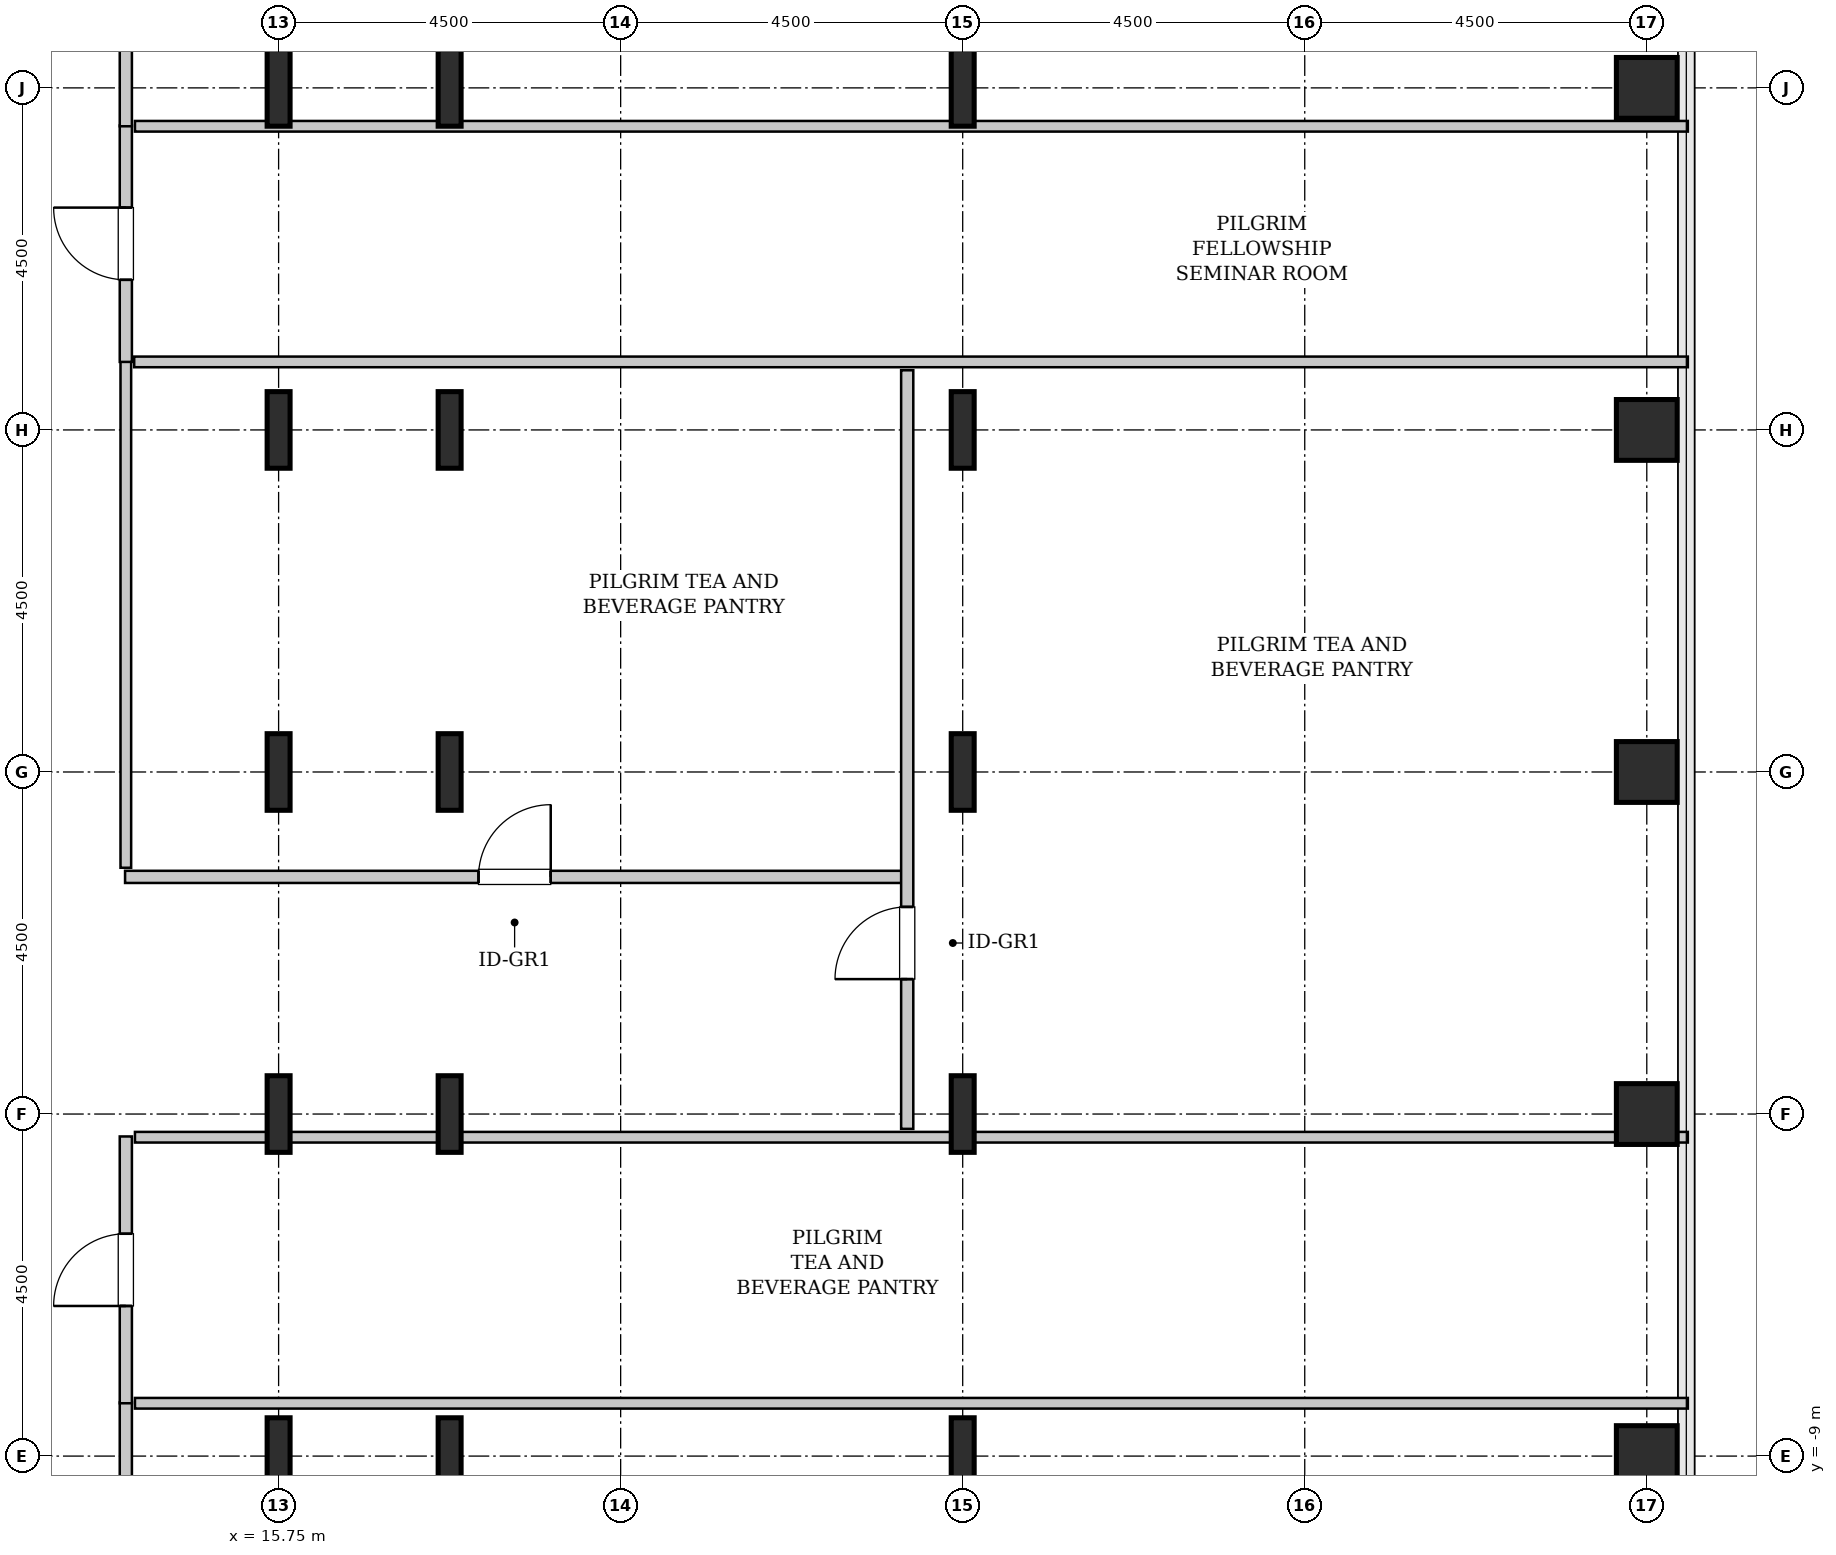
"""IFC4 building model, lengths in metres.
Left out: names, types, materials, properties, quantities, classifications, styles, units other than length and angle.
Written with IfcOpenShell. Run it as: python <this file> out.ifc"""

import sys

from ifc_helpers import new_model, si_unit, direction, frame, frame_2d, origin, origin_2d, place, context, subcontext, project, spatial, rectangle, hollow_rectangle, i_section, extrude, source, transform, mapped, element, fill, save


model = new_model("IFC4")
c1 = context("Model", 3, precision=1e-05, world=origin(), true_north=direction((0.0, 1.0)))
c2 = subcontext(c1, "Body", "Model", "MODEL_VIEW")
j1 = project(units=[si_unit("LENGTHUNIT", "METRE"), si_unit("PLANEANGLEUNIT", "RADIAN")], contexts=[c1])
p1 = place(None, origin())
s1 = spatial("IfcSite", under=j1, at=p1, CompositionType="ELEMENT")
p2 = place(p1, origin())
s2 = spatial("IfcBuilding", under=s1, at=p2, CompositionType="ELEMENT")
p3 = place(p2, frame((0.0, 0.0, 128.8)))
s3 = spatial("IfcBuildingStorey", under=s2, at=p3, CompositionType="ELEMENT", Elevation=128.8)
m1 = source(origin(), c2, "Body", "SweptSolid", [
    extrude(i_section(OverallWidth=0.302, OverallDepth=1.008, WebThickness=0.021, FlangeThickness=0.04, FilletRadius=0.03, at=origin_2d()), origin(), (0.0, 0.0, 1.0), 3.8),
])
for number, where, z_axis, x_axis in (
    (1, (15.75, -9.0, 0.0), (0.0, 0.0, 1.0), (1.0, 0.0, 0.0)),
    (2, (15.75, -4.5, 0.0), (0.0, 0.0, 1.0), (1.0, 0.0, 0.0)),
    (3, (15.75, 0.0, 0.0), (0.0, 0.0, 1.0), (1.0, 0.0, 0.0)),
    (4, (15.75, 4.5, 0.0), (0.0, 0.0, 1.0), (1.0, 0.0, 0.0)),
    (5, (15.75, 9.0, 0.0), (0.0, 0.0, 1.0), (1.0, 0.0, 0.0)),
    (6, (18.0, -9.0, 0.0), (0.0, 0.0, 1.0), (1.0, 0.0, 0.0)),
    (7, (18.0, -4.5, 0.0), (0.0, 0.0, 1.0), (1.0, 0.0, 0.0)),
    (8, (18.0, 0.0, 0.0), (0.0, 0.0, 1.0), (1.0, 0.0, 0.0)),
    (9, (18.0, 4.5, 0.0), (0.0, 0.0, 1.0), (1.0, 0.0, 0.0)),
    (10, (18.0, 9.0, 0.0), (0.0, 0.0, 1.0), (1.0, 0.0, 0.0)),
    (11, (24.75, -9.0, 0.0), (0.0, 0.0, 1.0), (1.0, 0.0, 0.0)),
    (12, (24.75, -4.5, 0.0), (0.0, 0.0, 1.0), (1.0, 0.0, 0.0)),
    (13, (24.75, 0.0, 0.0), (0.0, 0.0, 1.0), (1.0, 0.0, 0.0)),
    (14, (24.75, 4.5, 0.0), (0.0, 0.0, 1.0), (1.0, 0.0, 0.0)),
    (15, (24.75, 9.0, 0.0), (0.0, 0.0, 1.0), (1.0, 0.0, 0.0)),
):
    element("IfcColumn", number, at=place(p3, frame(where, z_axis=z_axis, x_axis=x_axis)), inside=s3, PredefinedType="COLUMN", context=c2, shape_type="MappedRepresentation", body=[
        mapped(m1, transform((0.0, 0.0, 0.0), x_axis=(1.0, 0.0, 0.0), y_axis=(0.0, 1.0, 0.0), z_axis=(0.0, 0.0, 1.0), scale=1.0)),
    ])
m2 = source(origin(), c2, "Body", "SweptSolid", [
    extrude(hollow_rectangle(XDim=0.8, YDim=0.8, WallThickness=0.04, InnerFilletRadius=0.04, OuterFilletRadius=0.08, at=origin_2d()), origin(), (0.0, 0.0, 1.0), 3.8),
])
for number, where, z_axis, x_axis in (
    (16, (33.75, -9.0, 0.0), (0.0, 0.0, 1.0), (1.0, 0.0, 0.0)),
    (17, (33.75, -4.5, 0.0), (0.0, 0.0, 1.0), (1.0, 0.0, 0.0)),
    (18, (33.75, 0.0, 0.0), (0.0, 0.0, 1.0), (1.0, 0.0, 0.0)),
    (19, (33.75, 4.5, 0.0), (0.0, 0.0, 1.0), (1.0, 0.0, 0.0)),
    (20, (33.75, 9.0, 0.0), (0.0, 0.0, 1.0), (1.0, 0.0, 0.0)),
):
    element("IfcColumn", number, at=place(p3, frame(where, z_axis=z_axis, x_axis=x_axis)), inside=s3, PredefinedType="COLUMN", context=c2, shape_type="MappedRepresentation", body=[
        mapped(m2, transform((0.0, 0.0, 0.0), x_axis=(1.0, 0.0, 0.0), y_axis=(0.0, 1.0, 0.0), z_axis=(0.0, 0.0, 1.0), scale=1.0)),
    ])
m3 = source(origin(), c2, "Body", "SweptSolid", [
    extrude(rectangle(XDim=14.745, YDim=0.16, at=frame_2d((7.373, 0.0))), origin(), (0.0, 0.0, 1.0), 3.535),
])
p4 = place(p3, frame((13.74, -23.04, 0.0), z_axis=(0.0, 0.0, 1.0), x_axis=(0.0, 1.0, 0.0)))
e21 = element("IfcWall", 21, at=p4, inside=s3, PredefinedType="PARTITIONING", context=c2, shape_type="MappedRepresentation", body=[
    mapped(m3, transform((0.0, 0.0, 0.0), x_axis=(1.0, 0.0, 0.0), y_axis=(0.0, 1.0, 0.0), z_axis=(0.0, 0.0, 1.0), scale=1.0)),
])
p5 = place(p4, frame((12.663, 0.0, 0.0)))
e22 = element("IfcOpeningElement", 22, at=p5, cuts=e21, PredefinedType="OPENING", context=c2, shape_type="SweptSolid", body=[
    extrude(rectangle(XDim=0.95, YDim=2.1, at=frame_2d((0.475, 1.05))), frame((0.0, 0.09, 0.0), z_axis=(0.0, -1.0, 0.0), x_axis=(1.0, 0.0, 0.0)), (0.0, 0.0, 1.0), 0.18),
])
m4 = source(origin(), c2, "Body", "SweptSolid", [
    extrude(rectangle(XDim=20.43, YDim=0.14, at=frame_2d((10.215, 0.0))), origin(), (0.0, 0.0, 1.0), 3.535),
])
p6 = place(p3, frame((13.86, -8.305, 0.0), z_axis=(0.0, 0.0, 1.0), x_axis=(1.0, 0.0, 0.0)))
e23 = element("IfcWall", 23, at=p6, inside=s3, PredefinedType="PARTITIONING", context=c2, shape_type="MappedRepresentation", body=[
    mapped(m4, transform((0.0, 0.0, 0.0), x_axis=(1.0, 0.0, 0.0), y_axis=(0.0, 1.0, 0.0), z_axis=(0.0, 0.0, 1.0), scale=1.0)),
])
m5 = source(origin(), c2, "Body", "SweptSolid", [
    extrude(rectangle(XDim=3.51, YDim=0.16, at=frame_2d((1.755, 0.0))), origin(), (0.0, 0.0, 1.0), 3.535),
])
p7 = place(p3, frame((13.74, -8.305, 0.0), z_axis=(0.0, 0.0, 1.0), x_axis=(0.0, 1.0, 0.0)))
e24 = element("IfcWall", 24, at=p7, inside=s3, PredefinedType="PARTITIONING", context=c2, shape_type="MappedRepresentation", body=[
    mapped(m5, transform((0.0, 0.0, 0.0), x_axis=(1.0, 0.0, 0.0), y_axis=(0.0, 1.0, 0.0), z_axis=(0.0, 0.0, 1.0), scale=1.0)),
])
p8 = place(p7, frame((1.28, 0.0, 0.0)))
e25 = element("IfcOpeningElement", 25, at=p8, cuts=e24, PredefinedType="OPENING", context=c2, shape_type="SweptSolid", body=[
    extrude(rectangle(XDim=0.95, YDim=2.1, at=frame_2d((0.475, 1.05))), frame((0.0, 0.09, 0.0), z_axis=(0.0, -1.0, 0.0), x_axis=(1.0, 0.0, 0.0)), (0.0, 0.0, 1.0), 0.18),
])
m6 = source(origin(), c2, "Body", "SweptSolid", [
    extrude(rectangle(XDim=20.43, YDim=0.14, at=frame_2d((10.215, 0.0))), origin(), (0.0, 0.0, 1.0), 2.875),
])
p9 = place(p3, frame((13.86, -4.805, 0.0), z_axis=(0.0, 0.0, 1.0), x_axis=(1.0, 0.0, 0.0)))
e26 = element("IfcWall", 26, at=p9, inside=s3, PredefinedType="PARTITIONING", context=c2, shape_type="MappedRepresentation", body=[
    mapped(m6, transform((0.0, 0.0, 0.0), x_axis=(1.0, 0.0, 0.0), y_axis=(0.0, 1.0, 0.0), z_axis=(0.0, 0.0, 1.0), scale=1.0)),
])
m7 = source(origin(), c2, "Body", "SweptSolid", [
    extrude(rectangle(XDim=10.25, YDim=0.16, at=frame_2d((5.125, 0.0))), origin(), (0.0, 0.0, 1.0), 3.535),
])
p10 = place(p3, frame((13.73, -1.38, 0.0), z_axis=(0.0, 0.0, 1.0), x_axis=(1.0, 0.0, 0.0)))
e27 = element("IfcWall", 27, at=p10, inside=s3, PredefinedType="PARTITIONING", context=c2, shape_type="MappedRepresentation", body=[
    mapped(m7, transform((0.0, 0.0, 0.0), x_axis=(1.0, 0.0, 0.0), y_axis=(0.0, 1.0, 0.0), z_axis=(0.0, 0.0, 1.0), scale=1.0)),
])
p11 = place(p10, frame((4.65, 0.0, 0.0)))
e28 = element("IfcOpeningElement", 28, at=p11, cuts=e27, PredefinedType="OPENING", context=c2, shape_type="SweptSolid", body=[
    extrude(rectangle(XDim=0.95, YDim=2.1, at=frame_2d((0.475, 1.05))), frame((0.0, 0.09, 0.0), z_axis=(0.0, -1.0, 0.0), x_axis=(1.0, 0.0, 0.0)), (0.0, 0.0, 1.0), 0.18),
])
m8 = source(origin(), c2, "Body", "SweptSolid", [
    extrude(rectangle(XDim=6.665, YDim=0.14, at=frame_2d((3.333, 0.0))), origin(), (0.0, 0.0, 1.0), 3.535),
])
p12 = place(p3, frame((13.74, -1.26, 0.0), z_axis=(0.0, 0.0, 1.0), x_axis=(0.0, 1.0, 0.0)))
e29 = element("IfcWall", 29, at=p12, inside=s3, PredefinedType="PARTITIONING", context=c2, shape_type="MappedRepresentation", body=[
    mapped(m8, transform((0.0, 0.0, 0.0), x_axis=(1.0, 0.0, 0.0), y_axis=(0.0, 1.0, 0.0), z_axis=(0.0, 0.0, 1.0), scale=1.0)),
])
m9 = source(origin(), c2, "Body", "SweptSolid", [
    extrude(rectangle(XDim=20.44, YDim=0.14, at=frame_2d((10.22, 0.0))), origin(), (0.0, 0.0, 1.0), 3.535),
])
p13 = place(p3, frame((13.85, 5.395, 0.0), z_axis=(0.0, 0.0, 1.0), x_axis=(1.0, 0.0, 0.0)))
e30 = element("IfcWall", 30, at=p13, inside=s3, PredefinedType="PARTITIONING", context=c2, shape_type="MappedRepresentation", body=[
    mapped(m9, transform((0.0, 0.0, 0.0), x_axis=(1.0, 0.0, 0.0), y_axis=(0.0, 1.0, 0.0), z_axis=(0.0, 0.0, 1.0), scale=1.0)),
])
m10 = source(origin(), c2, "Body", "SweptSolid", [
    extrude(rectangle(XDim=9.98, YDim=0.16, at=frame_2d((4.99, 0.0))), origin(), (0.0, 0.0, 1.0), 3.535),
])
p14 = place(p3, frame((24.02, -4.695, 0.0), z_axis=(0.0, 0.0, 1.0), x_axis=(0.0, 1.0, 0.0)))
e31 = element("IfcWall", 31, at=p14, inside=s3, PredefinedType="PARTITIONING", context=c2, shape_type="MappedRepresentation", body=[
    mapped(m10, transform((0.0, 0.0, 0.0), x_axis=(1.0, 0.0, 0.0), y_axis=(0.0, 1.0, 0.0), z_axis=(0.0, 0.0, 1.0), scale=1.0)),
])
p15 = place(p14, frame((1.97, 0.0, 0.0)))
e32 = element("IfcOpeningElement", 32, at=p15, cuts=e31, PredefinedType="OPENING", context=c2, shape_type="SweptSolid", body=[
    extrude(rectangle(XDim=0.95, YDim=2.1, at=frame_2d((0.475, 1.05))), frame((0.0, 0.09, 0.0), z_axis=(0.0, -1.0, 0.0), x_axis=(1.0, 0.0, 0.0)), (0.0, 0.0, 1.0), 0.18),
])
m11 = source(origin(), c2, "Body", "SweptSolid", [
    extrude(rectangle(XDim=3.11, YDim=0.16, at=frame_2d((1.555, 0.0))), origin(), (0.0, 0.0, 1.0), 3.535),
])
p16 = place(p3, frame((13.74, 5.395, 0.0), z_axis=(0.0, 0.0, 1.0), x_axis=(0.0, 1.0, 0.0)))
e33 = element("IfcWall", 33, at=p16, inside=s3, PredefinedType="PARTITIONING", context=c2, shape_type="MappedRepresentation", body=[
    mapped(m11, transform((0.0, 0.0, 0.0), x_axis=(1.0, 0.0, 0.0), y_axis=(0.0, 1.0, 0.0), z_axis=(0.0, 0.0, 1.0), scale=1.0)),
])
p17 = place(p16, frame((1.08, 0.0, 0.0)))
e34 = element("IfcOpeningElement", 34, at=p17, cuts=e33, PredefinedType="OPENING", context=c2, shape_type="SweptSolid", body=[
    extrude(rectangle(XDim=0.95, YDim=2.1, at=frame_2d((0.475, 1.05))), frame((0.0, 0.09, 0.0), z_axis=(0.0, -1.0, 0.0), x_axis=(1.0, 0.0, 0.0)), (0.0, 0.0, 1.0), 0.18),
])
p18 = place(p3, frame((13.86, 8.495, 0.0), z_axis=(0.0, 0.0, 1.0), x_axis=(1.0, 0.0, 0.0)))
e35 = element("IfcWall", 35, at=p18, inside=s3, PredefinedType="PARTITIONING", context=c2, shape_type="MappedRepresentation", body=[
    mapped(m6, transform((0.0, 0.0, 0.0), x_axis=(1.0, 0.0, 0.0), y_axis=(0.0, 1.0, 0.0), z_axis=(0.0, 0.0, 1.0), scale=1.0)),
])
m12 = source(origin(), c2, "Body", "SweptSolid", [
    extrude(rectangle(XDim=14.545, YDim=0.16, at=frame_2d((7.272, 0.0))), origin(), (0.0, 0.0, 1.0), 3.535),
])
p19 = place(p3, frame((13.74, 8.495, 0.0), z_axis=(0.0, 0.0, 1.0), x_axis=(0.0, 1.0, 0.0)))
e36 = element("IfcWall", 36, at=p19, inside=s3, PredefinedType="PARTITIONING", context=c2, shape_type="MappedRepresentation", body=[
    mapped(m12, transform((0.0, 0.0, 0.0), x_axis=(1.0, 0.0, 0.0), y_axis=(0.0, 1.0, 0.0), z_axis=(0.0, 0.0, 1.0), scale=1.0)),
])
p20 = place(p19, frame((1.032, 0.0, 0.0)))
e37 = element("IfcOpeningElement", 37, at=p20, cuts=e36, PredefinedType="OPENING", context=c2, shape_type="SweptSolid", body=[
    extrude(rectangle(XDim=0.95, YDim=2.1, at=frame_2d((0.475, 1.05))), frame((0.0, 0.09, 0.0), z_axis=(0.0, -1.0, 0.0), x_axis=(1.0, 0.0, 0.0)), (0.0, 0.0, 1.0), 0.18),
])
m13 = source(origin(), c2, "Body", "SweptSolid", [
    extrude(rectangle(XDim=0.95, YDim=2.1, at=frame_2d((0.475, 1.05))), frame((0.0, 0.025, 0.0), z_axis=(0.0, -1.0, 0.0), x_axis=(1.0, 0.0, 0.0)), (0.0, 0.0, 1.0), 0.05),
])
p21 = place(p8, origin())
e38 = element("IfcDoor", 38, at=p21, inside=s3, OperationType="SINGLE_SWING_LEFT", PredefinedType="DOOR", context=c2, shape_type="MappedRepresentation", body=[
    mapped(m13, transform((0.0, 0.0, 0.0), x_axis=(1.0, 0.0, 0.0), y_axis=(0.0, 1.0, 0.0), z_axis=(0.0, 0.0, 1.0), scale=1.0)),
])
fill(e25, e38)
p22 = place(p11, origin())
e39 = element("IfcDoor", 39, at=p22, inside=s3, OperationType="SINGLE_SWING_RIGHT", PredefinedType="DOOR", context=c2, shape_type="MappedRepresentation", body=[
    mapped(m13, transform((0.0, 0.0, 0.0), x_axis=(1.0, 0.0, 0.0), y_axis=(0.0, 1.0, 0.0), z_axis=(0.0, 0.0, 1.0), scale=1.0)),
])
fill(e28, e39)
p23 = place(p15, origin())
e40 = element("IfcDoor", 40, at=p23, inside=s3, OperationType="SINGLE_SWING_LEFT", PredefinedType="DOOR", context=c2, shape_type="MappedRepresentation", body=[
    mapped(m13, transform((0.0, 0.0, 0.0), x_axis=(1.0, 0.0, 0.0), y_axis=(0.0, 1.0, 0.0), z_axis=(0.0, 0.0, 1.0), scale=1.0)),
])
fill(e32, e40)
p24 = place(p17, origin())
e41 = element("IfcDoor", 41, at=p24, inside=s3, OperationType="SINGLE_SWING_RIGHT", PredefinedType="DOOR", context=c2, shape_type="MappedRepresentation", body=[
    mapped(m13, transform((0.0, 0.0, 0.0), x_axis=(1.0, 0.0, 0.0), y_axis=(0.0, 1.0, 0.0), z_axis=(0.0, 0.0, 1.0), scale=1.0)),
])
fill(e34, e41)
save(model, sys.argv[1])
